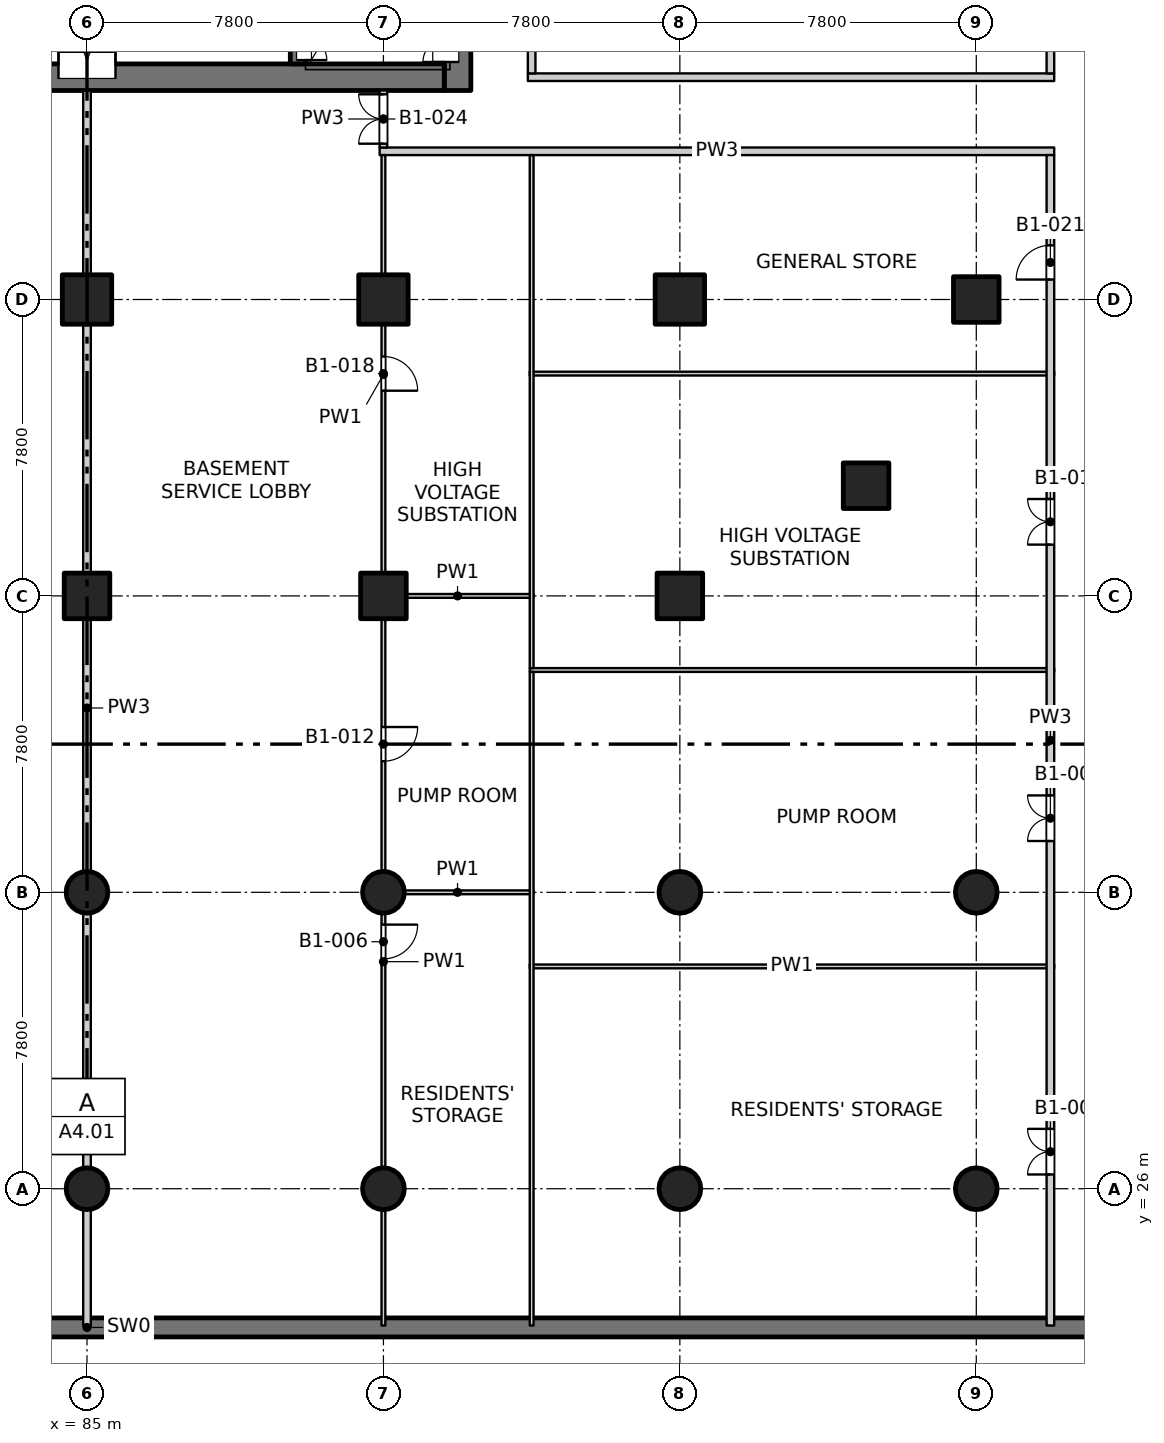
"""IFC4 building model, lengths in metres.
Left out: names, types, materials, properties, quantities, classifications, styles, units other than length and angle.
Written with IfcOpenShell. Run it as: python <this file> out.ifc"""

import sys

from ifc_helpers import new_model, si_unit, direction, frame, frame_2d, origin, origin_2d, place, context, subcontext, project, spatial, rectangle, circle, extrude, element, fill, save


model = new_model("IFC4")
c1 = context("Model", 3, precision=1e-05, world=origin(), true_north=direction((0.0, 1.0)))
c2 = subcontext(c1, "Body", "Model", "MODEL_VIEW")
j1 = project(units=[si_unit("LENGTHUNIT", "METRE"), si_unit("PLANEANGLEUNIT", "RADIAN")], contexts=[c1])
p1 = place(None, origin())
s1 = spatial("IfcSite", under=j1, at=p1, CompositionType="ELEMENT")
p2 = place(p1, origin())
s2 = spatial("IfcBuilding", under=s1, at=p2, CompositionType="ELEMENT")
p3 = place(p2, frame((0.0, 0.0, -4.5)))
s3 = spatial("IfcBuildingStorey", under=s2, at=p3, CompositionType="ELEMENT", Elevation=-4.5)
p4 = place(p3, frame((42.6, 22.35, -0.35), z_axis=(0.0, 0.0, 1.0), x_axis=(1.0, 0.0, 0.0)))
e1 = element("IfcWall", 1, at=p4, inside=s3, PredefinedType="SOLIDWALL", context=c2, shape_type="SweptSolid", body=[
    extrude(rectangle(XDim=84.8, YDim=0.5, at=frame_2d((42.4, 0.0))), origin(), (0.0, 0.0, 1.0), 4.45),
])
for number, where, z_axis, x_axis in (
    (2, (105.5, 44.5, -0.35), (0.0, 0.0, 1.0), (1.0, 0.0, 0.0)),
    (3, (108.4, 49.4, -0.35), (0.0, 0.0, 1.0), (1.0, 0.0, 0.0)),
    (4, (85.0, 41.6, -0.35), (0.0, 0.0, 1.0), (1.0, 0.0, 0.0)),
    (5, (92.8, 41.6, -0.35), (0.0, 0.0, 1.0), (1.0, 0.0, 0.0)),
    (6, (100.6, 41.6, -0.35), (0.0, 0.0, 1.0), (1.0, 0.0, 0.0)),
):
    element("IfcColumn", number, at=place(p3, frame(where, z_axis=z_axis, x_axis=x_axis)), inside=s3, PredefinedType="COLUMN", context=c2, shape_type="SweptSolid", body=[
        extrude(rectangle(XDim=1.2, YDim=1.2, at=origin_2d()), origin(), (0.0, 0.0, 1.0), 4.45),
    ])
for number, where, z_axis, x_axis in (
    (7, (85.0, 49.4, -0.35), (0.0, 0.0, 1.0), (1.0, 0.0, 0.0)),
    (8, (92.8, 49.4, -0.35), (0.0, 0.0, 1.0), (1.0, 0.0, 0.0)),
    (9, (100.6, 49.4, -0.35), (0.0, 0.0, 1.0), (1.0, 0.0, 0.0)),
):
    element("IfcColumn", number, at=place(p3, frame(where, z_axis=z_axis, x_axis=x_axis)), inside=s3, PredefinedType="COLUMN", context=c2, shape_type="SweptSolid", body=[
        extrude(rectangle(XDim=1.3, YDim=1.3, at=origin_2d()), origin(), (0.0, 0.0, 1.0), 4.45),
    ])
for number, where, z_axis, x_axis in (
    (10, (85.0, 26.0, -0.35), (0.0, 0.0, 1.0), (1.0, 0.0, 0.0)),
    (11, (85.0, 33.8, -0.35), (0.0, 0.0, 1.0), (1.0, 0.0, 0.0)),
    (12, (92.8, 26.0, -0.35), (0.0, 0.0, 1.0), (1.0, 0.0, 0.0)),
    (13, (92.8, 33.8, -0.35), (0.0, 0.0, 1.0), (1.0, 0.0, 0.0)),
    (14, (100.6, 26.0, -0.35), (0.0, 0.0, 1.0), (1.0, 0.0, 0.0)),
    (15, (100.6, 33.8, -0.35), (0.0, 0.0, 1.0), (1.0, 0.0, 0.0)),
    (16, (108.4, 26.0, -0.35), (0.0, 0.0, 1.0), (1.0, 0.0, 0.0)),
    (17, (108.4, 33.8, -0.35), (0.0, 0.0, 1.0), (1.0, 0.0, 0.0)),
):
    element("IfcColumn", number, at=place(p3, frame(where, z_axis=z_axis, x_axis=x_axis)), inside=s3, PredefinedType="COLUMN", context=c2, shape_type="SweptSolid", body=[
        extrude(circle(Radius=0.55, at=origin_2d()), origin(), (0.0, 0.0, 1.0), 4.45),
    ])
p5 = place(p3, frame((94.75, 54.9, -0.35), z_axis=(0.0, 0.0, 1.0), x_axis=(0.0, 1.0, 0.0)))
e18 = element("IfcWall", 18, at=p5, inside=s3, PredefinedType="SOLIDWALL", context=c2, shape_type="SweptSolid", body=[
    extrude(rectangle(XDim=7.05, YDim=0.7, at=frame_2d((3.525, 0.0))), origin(), (0.0, 0.0, 1.0), 4.45),
])
p6 = place(p5, frame((0.75, 0.0, 0.35)))
e19 = element("IfcOpeningElement", 19, at=p6, cuts=e18, PredefinedType="OPENING", context=c2, shape_type="SweptSolid", body=[
    extrude(rectangle(XDim=1.2, YDim=2.1, at=frame_2d((0.6, 1.05))), frame((0.0, 0.36, 0.0), z_axis=(0.0, -1.0, 0.0), x_axis=(1.0, 0.0, 0.0)), (0.0, 0.0, 1.0), 0.72),
])
p7 = place(p3, frame((75.6, 55.25, -0.35), z_axis=(0.0, 0.0, 1.0), x_axis=(1.0, 0.0, 0.0)))
e20 = element("IfcWall", 20, at=p7, inside=s3, PredefinedType="SOLIDWALL", context=c2, shape_type="SweptSolid", body=[
    extrude(rectangle(XDim=18.8, YDim=0.7, at=frame_2d((9.4, 0.0))), origin(), (0.0, 0.0, 1.0), 4.45),
])
p8 = place(p7, frame((8.65, 0.0, 0.35)))
e21 = element("IfcOpeningElement", 21, at=p8, cuts=e20, PredefinedType="OPENING", context=c2, shape_type="SweptSolid", body=[
    extrude(rectangle(XDim=1.5, YDim=2.1, at=frame_2d((0.75, 1.05))), frame((0.0, 0.36, 0.0), z_axis=(0.0, -1.0, 0.0), x_axis=(1.0, 0.0, 0.0)), (0.0, 0.0, 1.0), 0.72),
])
p9 = place(p3, frame((90.55, 55.6, -0.35), z_axis=(0.0, 0.0, 1.0), x_axis=(0.0, 1.0, 0.0)))
e22 = element("IfcWall", 22, at=p9, inside=s3, PredefinedType="SOLIDWALL", context=c2, shape_type="SweptSolid", body=[
    extrude(rectangle(XDim=6.35, YDim=0.4, at=frame_2d((3.175, 0.0))), origin(), (0.0, 0.0, 1.0), 4.45),
])
p10 = place(p9, frame((0.1, 0.0, 0.35)))
e23 = element("IfcOpeningElement", 23, at=p10, cuts=e22, PredefinedType="OPENING", context=c2, shape_type="SweptSolid", body=[
    extrude(rectangle(XDim=1.2, YDim=2.1, at=frame_2d((0.6, 1.05))), frame((0.0, 0.21, 0.0), z_axis=(0.0, -1.0, 0.0), x_axis=(1.0, 0.0, 0.0)), (0.0, 0.0, 1.0), 0.42),
])
p11 = place(p3, frame((96.65, 31.85, 0.0), z_axis=(0.0, 0.0, 1.0), x_axis=(1.0, 0.0, 0.0)))
e24 = element("IfcWall", 24, at=p11, inside=s3, PredefinedType="PARTITIONING", context=c2, shape_type="SweptSolid", body=[
    extrude(rectangle(XDim=13.8, YDim=0.1, at=frame_2d((6.9, 0.0))), origin(), (0.0, 0.0, 1.0), 4.1),
])
p12 = place(p3, frame((92.75, 33.8, 0.0), z_axis=(0.0, 0.0, 1.0), x_axis=(1.0, 0.0, 0.0)))
e25 = element("IfcWall", 25, at=p12, inside=s3, PredefinedType="PARTITIONING", context=c2, shape_type="SweptSolid", body=[
    extrude(rectangle(XDim=4.0, YDim=0.1, at=frame_2d((2.0, 0.0))), origin(), (0.0, 0.0, 1.0), 4.1),
])
p13 = place(p3, frame((96.65, 39.65, 0.0), z_axis=(0.0, 0.0, 1.0), x_axis=(1.0, 0.0, 0.0)))
e26 = element("IfcWall", 26, at=p13, inside=s3, PredefinedType="PARTITIONING", context=c2, shape_type="SweptSolid", body=[
    extrude(rectangle(XDim=13.8, YDim=0.1, at=frame_2d((6.9, 0.0))), origin(), (0.0, 0.0, 1.0), 4.1),
])
p14 = place(p3, frame((92.75, 41.6, 0.0), z_axis=(0.0, 0.0, 1.0), x_axis=(1.0, 0.0, 0.0)))
e27 = element("IfcWall", 27, at=p14, inside=s3, PredefinedType="PARTITIONING", context=c2, shape_type="SweptSolid", body=[
    extrude(rectangle(XDim=4.0, YDim=0.1, at=frame_2d((2.0, 0.0))), origin(), (0.0, 0.0, 1.0), 4.1),
])
p15 = place(p3, frame((96.65, 47.45, 0.0), z_axis=(0.0, 0.0, 1.0), x_axis=(1.0, 0.0, 0.0)))
e28 = element("IfcWall", 28, at=p15, inside=s3, PredefinedType="PARTITIONING", context=c2, shape_type="SweptSolid", body=[
    extrude(rectangle(XDim=13.8, YDim=0.1, at=frame_2d((6.9, 0.0))), origin(), (0.0, 0.0, 1.0), 4.1),
])
p16 = place(p3, frame((92.7, 53.3, 0.0), z_axis=(0.0, 0.0, 1.0), x_axis=(1.0, 0.0, 0.0)))
e29 = element("IfcWall", 29, at=p16, inside=s3, PredefinedType="PARTITIONING", context=c2, shape_type="SweptSolid", body=[
    extrude(rectangle(XDim=17.75, YDim=0.2, at=frame_2d((8.875, 0.0))), origin(), (0.0, 0.0, 1.0), 4.1),
])
p17 = place(p3, frame((96.6, 55.25, 0.0), z_axis=(0.0, 0.0, 1.0), x_axis=(1.0, 0.0, 0.0)))
e30 = element("IfcWall", 30, at=p17, inside=s3, PredefinedType="PARTITIONING", context=c2, shape_type="SweptSolid", body=[
    extrude(rectangle(XDim=13.85, YDim=0.2, at=frame_2d((6.925, 0.0))), origin(), (0.0, 0.0, 1.0), 4.1),
])
p18 = place(p3, frame((85.0, 22.4, 0.0), z_axis=(0.0, 0.0, 1.0), x_axis=(0.0, 1.0, 0.0)))
e31 = element("IfcWall", 31, at=p18, inside=s3, PredefinedType="PARTITIONING", context=c2, shape_type="SweptSolid", body=[
    extrude(rectangle(XDim=32.5, YDim=0.2, at=frame_2d((16.25, 0.0))), origin(), (0.0, 0.0, 1.0), 4.1),
])
p19 = place(p3, frame((92.8, 22.4, 0.0), z_axis=(0.0, 0.0, 1.0), x_axis=(0.0, 1.0, 0.0)))
e32 = element("IfcWall", 32, at=p19, inside=s3, PredefinedType="PARTITIONING", context=c2, shape_type="SweptSolid", body=[
    extrude(rectangle(XDim=19.15, YDim=0.1, at=frame_2d((9.575, 0.0))), origin(), (0.0, 0.0, 1.0), 4.1),
])
p20 = place(p19, frame((9.65, 0.0, 0.0)))
e33 = element("IfcOpeningElement", 33, at=p20, cuts=e32, PredefinedType="OPENING", context=c2, shape_type="SweptSolid", body=[
    extrude(rectangle(XDim=0.9, YDim=2.1, at=frame_2d((0.45, 1.05))), frame((0.0, 0.06, 0.0), z_axis=(0.0, -1.0, 0.0), x_axis=(1.0, 0.0, 0.0)), (0.0, 0.0, 1.0), 0.12),
])
p21 = place(p19, frame((14.85, 0.0, 0.0)))
e34 = element("IfcOpeningElement", 34, at=p21, cuts=e32, PredefinedType="OPENING", context=c2, shape_type="SweptSolid", body=[
    extrude(rectangle(XDim=0.9, YDim=2.1, at=frame_2d((0.45, 1.05))), frame((0.0, 0.06, 0.0), z_axis=(0.0, -1.0, 0.0), x_axis=(1.0, 0.0, 0.0)), (0.0, 0.0, 1.0), 0.12),
])
p22 = place(p3, frame((92.8, 41.65, 0.0), z_axis=(0.0, 0.0, 1.0), x_axis=(0.0, 1.0, 0.0)))
e35 = element("IfcWall", 35, at=p22, inside=s3, PredefinedType="PARTITIONING", context=c2, shape_type="SweptSolid", body=[
    extrude(rectangle(XDim=11.55, YDim=0.1, at=frame_2d((5.775, 0.0))), origin(), (0.0, 0.0, 1.0), 4.1),
])
p23 = place(p22, frame((5.35, 0.0, 0.0)))
e36 = element("IfcOpeningElement", 36, at=p23, cuts=e35, PredefinedType="OPENING", context=c2, shape_type="SweptSolid", body=[
    extrude(rectangle(XDim=0.9, YDim=2.1, at=frame_2d((0.45, 1.05))), frame((0.0, 0.06, 0.0), z_axis=(0.0, -1.0, 0.0), x_axis=(1.0, 0.0, 0.0)), (0.0, 0.0, 1.0), 0.12),
])
p24 = place(p3, frame((92.8, 53.4, 0.0), z_axis=(0.0, 0.0, 1.0), x_axis=(0.0, 1.0, 0.0)))
e37 = element("IfcWall", 37, at=p24, inside=s3, PredefinedType="PARTITIONING", context=c2, shape_type="SweptSolid", body=[
    extrude(rectangle(XDim=1.5, YDim=0.2, at=frame_2d((0.75, 0.0))), origin(), (0.0, 0.0, 1.0), 4.1),
])
p25 = place(p24, frame((0.1, 0.0, 0.0)))
e38 = element("IfcOpeningElement", 38, at=p25, cuts=e37, PredefinedType="OPENING", context=c2, shape_type="SweptSolid", body=[
    extrude(rectangle(XDim=1.3, YDim=2.1, at=frame_2d((0.65, 1.05))), frame((0.0, 0.11, 0.0), z_axis=(0.0, -1.0, 0.0), x_axis=(1.0, 0.0, 0.0)), (0.0, 0.0, 1.0), 0.22),
])
p26 = place(p3, frame((96.7, 22.4, 0.0), z_axis=(0.0, 0.0, 1.0), x_axis=(0.0, 1.0, 0.0)))
e39 = element("IfcWall", 39, at=p26, inside=s3, PredefinedType="PARTITIONING", context=c2, shape_type="SweptSolid", body=[
    extrude(rectangle(XDim=17.2, YDim=0.1, at=frame_2d((8.6, 0.0))), origin(), (0.0, 0.0, 1.0), 4.1),
])
p27 = place(p3, frame((96.7, 39.7, 0.0), z_axis=(0.0, 0.0, 1.0), x_axis=(0.0, 1.0, 0.0)))
e40 = element("IfcWall", 40, at=p27, inside=s3, PredefinedType="PARTITIONING", context=c2, shape_type="SweptSolid", body=[
    extrude(rectangle(XDim=13.5, YDim=0.1, at=frame_2d((6.75, 0.0))), origin(), (0.0, 0.0, 1.0), 4.1),
])
p28 = place(p3, frame((96.7, 55.35, 0.0), z_axis=(0.0, 0.0, 1.0), x_axis=(0.0, 1.0, 0.0)))
e41 = element("IfcWall", 41, at=p28, inside=s3, PredefinedType="PARTITIONING", context=c2, shape_type="SweptSolid", body=[
    extrude(rectangle(XDim=36.65, YDim=0.2, at=frame_2d((18.325, 0.0))), origin(), (0.0, 0.0, 1.0), 4.1),
])
p29 = place(p3, frame((110.35, 22.4, 0.0), z_axis=(0.0, 0.0, 1.0), x_axis=(0.0, 1.0, 0.0)))
e42 = element("IfcWall", 42, at=p29, inside=s3, PredefinedType="PARTITIONING", context=c2, shape_type="SweptSolid", body=[
    extrude(rectangle(XDim=30.8, YDim=0.2, at=frame_2d((15.4, 0.0))), origin(), (0.0, 0.0, 1.0), 4.1),
])
p30 = place(p29, frame((3.975, 0.0, 0.0)))
e43 = element("IfcOpeningElement", 43, at=p30, cuts=e42, PredefinedType="OPENING", context=c2, shape_type="SweptSolid", body=[
    extrude(rectangle(XDim=1.2, YDim=2.1, at=frame_2d((0.6, 1.05))), frame((0.0, 0.11, 0.0), z_axis=(0.0, -1.0, 0.0), x_axis=(1.0, 0.0, 0.0)), (0.0, 0.0, 1.0), 0.22),
])
p31 = place(p29, frame((12.75, 0.0, 0.0)))
e44 = element("IfcOpeningElement", 44, at=p31, cuts=e42, PredefinedType="OPENING", context=c2, shape_type="SweptSolid", body=[
    extrude(rectangle(XDim=1.2, YDim=2.1, at=frame_2d((0.6, 1.05))), frame((0.0, 0.11, 0.0), z_axis=(0.0, -1.0, 0.0), x_axis=(1.0, 0.0, 0.0)), (0.0, 0.0, 1.0), 0.22),
])
p32 = place(p29, frame((20.55, 0.0, 0.0)))
e45 = element("IfcOpeningElement", 45, at=p32, cuts=e42, PredefinedType="OPENING", context=c2, shape_type="SweptSolid", body=[
    extrude(rectangle(XDim=1.2, YDim=2.1, at=frame_2d((0.6, 1.05))), frame((0.0, 0.11, 0.0), z_axis=(0.0, -1.0, 0.0), x_axis=(1.0, 0.0, 0.0)), (0.0, 0.0, 1.0), 0.22),
])
p33 = place(p29, frame((27.525, 0.0, 0.0)))
e46 = element("IfcOpeningElement", 46, at=p33, cuts=e42, PredefinedType="OPENING", context=c2, shape_type="SweptSolid", body=[
    extrude(rectangle(XDim=0.9, YDim=2.1, at=frame_2d((0.45, 1.05))), frame((0.0, 0.11, 0.0), z_axis=(0.0, -1.0, 0.0), x_axis=(1.0, 0.0, 0.0)), (0.0, 0.0, 1.0), 0.22),
])
p34 = place(p3, frame((110.35, 55.35, 0.0), z_axis=(0.0, 0.0, 1.0), x_axis=(0.0, 1.0, 0.0)))
e47 = element("IfcWall", 47, at=p34, inside=s3, PredefinedType="PARTITIONING", context=c2, shape_type="SweptSolid", body=[
    extrude(rectangle(XDim=36.65, YDim=0.2, at=frame_2d((18.325, 0.0))), origin(), (0.0, 0.0, 1.0), 4.1),
])
p35 = place(p34, frame((3.2, 0.0, 0.0)))
e48 = element("IfcOpeningElement", 48, at=p35, cuts=e47, PredefinedType="OPENING", context=c2, shape_type="SweptSolid", body=[
    extrude(rectangle(XDim=1.2, YDim=2.1, at=frame_2d((0.6, 1.05))), frame((0.0, 0.11, 0.0), z_axis=(0.0, -1.0, 0.0), x_axis=(1.0, 0.0, 0.0)), (0.0, 0.0, 1.0), 0.22),
])
p36 = place(p34, frame((11.0, 0.0, 0.0)))
e49 = element("IfcOpeningElement", 49, at=p36, cuts=e47, PredefinedType="OPENING", context=c2, shape_type="SweptSolid", body=[
    extrude(rectangle(XDim=1.2, YDim=2.1, at=frame_2d((0.6, 1.05))), frame((0.0, 0.11, 0.0), z_axis=(0.0, -1.0, 0.0), x_axis=(1.0, 0.0, 0.0)), (0.0, 0.0, 1.0), 0.22),
])
p37 = place(p34, frame((18.8, 0.0, 0.0)))
e50 = element("IfcOpeningElement", 50, at=p37, cuts=e47, PredefinedType="OPENING", context=c2, shape_type="SweptSolid", body=[
    extrude(rectangle(XDim=1.2, YDim=2.1, at=frame_2d((0.6, 1.05))), frame((0.0, 0.11, 0.0), z_axis=(0.0, -1.0, 0.0), x_axis=(1.0, 0.0, 0.0)), (0.0, 0.0, 1.0), 0.22),
])
p38 = place(p34, frame((29.525, 0.0, 0.0)))
e51 = element("IfcOpeningElement", 51, at=p38, cuts=e47, PredefinedType="OPENING", context=c2, shape_type="SweptSolid", body=[
    extrude(rectangle(XDim=1.2, YDim=2.1, at=frame_2d((0.6, 1.05))), frame((0.0, 0.11, 0.0), z_axis=(0.0, -1.0, 0.0), x_axis=(1.0, 0.0, 0.0)), (0.0, 0.0, 1.0), 0.22),
])
p39 = place(p30, origin())
e52 = element("IfcDoor", 52, at=p39, inside=s3, OperationType="DOUBLE_DOOR_SINGLE_SWING", PredefinedType="DOOR", context=c2, shape_type="SweptSolid", body=[
    extrude(rectangle(XDim=1.2, YDim=2.1, at=frame_2d((0.6, 1.05))), frame((0.0, 0.025, 0.0), z_axis=(0.0, -1.0, 0.0), x_axis=(1.0, 0.0, 0.0)), (0.0, 0.0, 1.0), 0.05),
])
fill(e43, e52)
p40 = place(p20, origin())
e53 = element("IfcDoor", 53, at=p40, inside=s3, OperationType="SINGLE_SWING_LEFT", PredefinedType="DOOR", context=c2, shape_type="SweptSolid", body=[
    extrude(rectangle(XDim=0.9, YDim=2.1, at=frame_2d((0.45, 1.05))), frame((0.0, 0.025, 0.0), z_axis=(0.0, -1.0, 0.0), x_axis=(1.0, 0.0, 0.0)), (0.0, 0.0, 1.0), 0.05),
])
fill(e33, e53)
p41 = place(p31, origin())
e54 = element("IfcDoor", 54, at=p41, inside=s3, OperationType="DOUBLE_DOOR_SINGLE_SWING", PredefinedType="DOOR", context=c2, shape_type="SweptSolid", body=[
    extrude(rectangle(XDim=1.2, YDim=2.1, at=frame_2d((0.6, 1.05))), frame((0.0, 0.025, 0.0), z_axis=(0.0, -1.0, 0.0), x_axis=(1.0, 0.0, 0.0)), (0.0, 0.0, 1.0), 0.05),
])
fill(e44, e54)
p42 = place(p21, origin())
e55 = element("IfcDoor", 55, at=p42, inside=s3, OperationType="SINGLE_SWING_LEFT", PredefinedType="DOOR", context=c2, shape_type="SweptSolid", body=[
    extrude(rectangle(XDim=0.9, YDim=2.1, at=frame_2d((0.45, 1.05))), frame((0.0, 0.025, 0.0), z_axis=(0.0, -1.0, 0.0), x_axis=(1.0, 0.0, 0.0)), (0.0, 0.0, 1.0), 0.05),
])
fill(e34, e55)
p43 = place(p32, origin())
e56 = element("IfcDoor", 56, at=p43, inside=s3, OperationType="DOUBLE_DOOR_SINGLE_SWING", PredefinedType="DOOR", context=c2, shape_type="SweptSolid", body=[
    extrude(rectangle(XDim=1.2, YDim=2.1, at=frame_2d((0.6, 1.05))), frame((0.0, 0.025, 0.0), z_axis=(0.0, -1.0, 0.0), x_axis=(1.0, 0.0, 0.0)), (0.0, 0.0, 1.0), 0.05),
])
fill(e45, e56)
p44 = place(p23, origin())
e57 = element("IfcDoor", 57, at=p44, inside=s3, OperationType="SINGLE_SWING_RIGHT", PredefinedType="DOOR", context=c2, shape_type="SweptSolid", body=[
    extrude(rectangle(XDim=0.9, YDim=2.1, at=frame_2d((0.45, 1.05))), frame((0.0, 0.025, 0.0), z_axis=(0.0, -1.0, 0.0), x_axis=(1.0, 0.0, 0.0)), (0.0, 0.0, 1.0), 0.05),
])
fill(e36, e57)
p45 = place(p33, origin())
e58 = element("IfcDoor", 58, at=p45, inside=s3, OperationType="SINGLE_SWING_LEFT", PredefinedType="DOOR", context=c2, shape_type="SweptSolid", body=[
    extrude(rectangle(XDim=0.9, YDim=2.1, at=frame_2d((0.45, 1.05))), frame((0.0, 0.025, 0.0), z_axis=(0.0, -1.0, 0.0), x_axis=(1.0, 0.0, 0.0)), (0.0, 0.0, 1.0), 0.05),
])
fill(e46, e58)
p46 = place(p25, origin())
e59 = element("IfcDoor", 59, at=p46, inside=s3, OperationType="DOUBLE_DOOR_SINGLE_SWING", PredefinedType="DOOR", context=c2, shape_type="SweptSolid", body=[
    extrude(rectangle(XDim=1.3, YDim=2.1, at=frame_2d((0.65, 1.05))), frame((0.0, 0.025, 0.0), z_axis=(0.0, -1.0, 0.0), x_axis=(1.0, 0.0, 0.0)), (0.0, 0.0, 1.0), 0.05),
])
fill(e38, e59)
p47 = place(p8, origin())
e60 = element("IfcDoor", 60, at=p47, inside=s3, OperationType="DOUBLE_DOOR_SINGLE_SWING", PredefinedType="DOOR", context=c2, shape_type="SweptSolid", body=[
    extrude(rectangle(XDim=1.5, YDim=2.1, at=frame_2d((0.75, 1.05))), frame((0.0, 0.335, 0.0), z_axis=(0.0, -1.0, 0.0), x_axis=(1.0, 0.0, 0.0)), (0.0, 0.0, 1.0), 0.05),
])
fill(e21, e60)
p48 = place(p10, origin())
e61 = element("IfcDoor", 61, at=p48, inside=s3, OperationType="DOUBLE_DOOR_SINGLE_SWING", PredefinedType="DOOR", context=c2, shape_type="SweptSolid", body=[
    extrude(rectangle(XDim=1.2, YDim=2.1, at=frame_2d((0.6, 1.05))), frame((0.0, -0.135, 0.0), z_axis=(0.0, -1.0, 0.0), x_axis=(1.0, 0.0, 0.0)), (0.0, 0.0, 1.0), 0.05),
])
fill(e23, e61)
p49 = place(p6, origin())
e62 = element("IfcDoor", 62, at=p49, inside=s3, OperationType="DOUBLE_DOOR_SINGLE_SWING", PredefinedType="DOOR", context=c2, shape_type="SweptSolid", body=[
    extrude(rectangle(XDim=1.2, YDim=2.1, at=frame_2d((0.6, 1.05))), frame((0.0, 0.335, 0.0), z_axis=(0.0, -1.0, 0.0), x_axis=(1.0, 0.0, 0.0)), (0.0, 0.0, 1.0), 0.05),
])
fill(e19, e62)
save(model, sys.argv[1])
